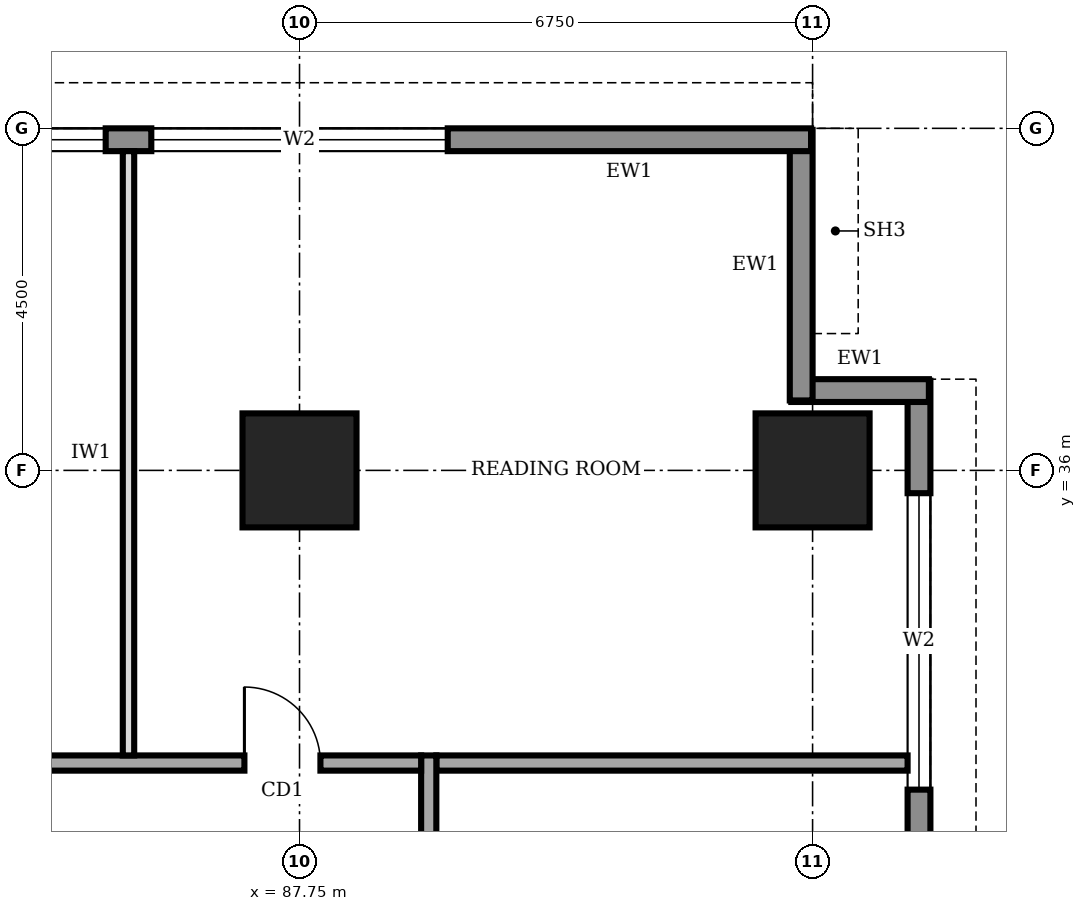
"""IFC4 building model, lengths in metres.
Left out: names, types, materials, properties, quantities, classifications, styles, units other than length and angle.
Written with IfcOpenShell. Run it as: python <this file> out.ifc"""

import sys

from ifc_helpers import new_model, si_unit, direction, frame, frame_2d, origin, origin_2d, place, context, subcontext, project, spatial, rectangle, extrude, element, fill, save


model = new_model("IFC4")
c1 = context("Model", 3, precision=1e-05, world=origin(), true_north=direction((0.0, 1.0)))
c2 = subcontext(c1, "Body", "Model", "MODEL_VIEW")
j1 = project(units=[si_unit("LENGTHUNIT", "METRE"), si_unit("PLANEANGLEUNIT", "RADIAN")], contexts=[c1])
p1 = place(None, origin())
s1 = spatial("IfcSite", under=j1, at=p1, CompositionType="ELEMENT")
p2 = place(p1, origin())
s2 = spatial("IfcBuilding", under=s1, at=p2, CompositionType="ELEMENT")
p3 = place(p2, frame((0.0, 0.0, 165.0)))
s3 = spatial("IfcBuildingStorey", under=s2, at=p3, CompositionType="ELEMENT", Elevation=165.0)
for number, where, z_axis, x_axis in (
    (1, (87.75, 36.0, 0.0), (0.0, 0.0, 1.0), (1.0, 0.0, 0.0)),
    (2, (94.5, 36.0, 0.0), (0.0, 0.0, 1.0), (1.0, 0.0, 0.0)),
):
    element("IfcColumn", number, at=place(p3, frame(where, z_axis=z_axis, x_axis=x_axis)), inside=s3, PredefinedType="COLUMN", context=c2, shape_type="SweptSolid", body=[
        extrude(rectangle(XDim=1.5, YDim=1.5, at=origin_2d()), origin(), (0.0, 0.0, 1.0), 4.0),
    ])
p4 = place(p3, frame((95.9, 3.32, 0.0), z_axis=(0.0, 0.0, 1.0), x_axis=(0.0, 1.0, 0.0)))
e3 = element("IfcWall", 3, at=p4, inside=s3, PredefinedType="STANDARD", context=c2, shape_type="SweptSolid", body=[
    extrude(rectangle(XDim=33.86, YDim=0.3, at=frame_2d((16.93, 0.0))), origin(), (0.0, 0.0, 1.0), 3.75),
])
p5 = place(p4, frame((1.48, 0.0, 0.6)))
e4 = element("IfcOpeningElement", 4, at=p5, cuts=e3, PredefinedType="OPENING", context=c2, shape_type="SweptSolid", body=[
    extrude(rectangle(XDim=3.9, YDim=2.6, at=frame_2d((1.95, 1.3))), frame((0.0, 0.16, 0.0), z_axis=(0.0, -1.0, 0.0), x_axis=(1.0, 0.0, 0.0)), (0.0, 0.0, 1.0), 0.32),
])
p6 = place(p4, frame((5.98, 0.0, 0.6)))
e5 = element("IfcOpeningElement", 5, at=p6, cuts=e3, PredefinedType="OPENING", context=c2, shape_type="SweptSolid", body=[
    extrude(rectangle(XDim=3.9, YDim=2.6, at=frame_2d((1.95, 1.3))), frame((0.0, 0.16, 0.0), z_axis=(0.0, -1.0, 0.0), x_axis=(1.0, 0.0, 0.0)), (0.0, 0.0, 1.0), 0.32),
])
p7 = place(p4, frame((10.48, 0.0, 0.6)))
e6 = element("IfcOpeningElement", 6, at=p7, cuts=e3, PredefinedType="OPENING", context=c2, shape_type="SweptSolid", body=[
    extrude(rectangle(XDim=3.9, YDim=2.6, at=frame_2d((1.95, 1.3))), frame((0.0, 0.16, 0.0), z_axis=(0.0, -1.0, 0.0), x_axis=(1.0, 0.0, 0.0)), (0.0, 0.0, 1.0), 0.32),
])
p8 = place(p4, frame((14.98, 0.0, 0.6)))
e7 = element("IfcOpeningElement", 7, at=p8, cuts=e3, PredefinedType="OPENING", context=c2, shape_type="SweptSolid", body=[
    extrude(rectangle(XDim=3.9, YDim=2.6, at=frame_2d((1.95, 1.3))), frame((0.0, 0.16, 0.0), z_axis=(0.0, -1.0, 0.0), x_axis=(1.0, 0.0, 0.0)), (0.0, 0.0, 1.0), 0.32),
])
p9 = place(p4, frame((19.48, 0.0, 0.6)))
e8 = element("IfcOpeningElement", 8, at=p9, cuts=e3, PredefinedType="OPENING", context=c2, shape_type="SweptSolid", body=[
    extrude(rectangle(XDim=3.9, YDim=2.6, at=frame_2d((1.95, 1.3))), frame((0.0, 0.16, 0.0), z_axis=(0.0, -1.0, 0.0), x_axis=(1.0, 0.0, 0.0)), (0.0, 0.0, 1.0), 0.32),
])
p10 = place(p4, frame((23.98, 0.0, 0.6)))
e9 = element("IfcOpeningElement", 9, at=p10, cuts=e3, PredefinedType="OPENING", context=c2, shape_type="SweptSolid", body=[
    extrude(rectangle(XDim=3.9, YDim=2.6, at=frame_2d((1.95, 1.3))), frame((0.0, 0.16, 0.0), z_axis=(0.0, -1.0, 0.0), x_axis=(1.0, 0.0, 0.0)), (0.0, 0.0, 1.0), 0.32),
])
p11 = place(p4, frame((28.48, 0.0, 0.6)))
e10 = element("IfcOpeningElement", 10, at=p11, cuts=e3, PredefinedType="OPENING", context=c2, shape_type="SweptSolid", body=[
    extrude(rectangle(XDim=3.9, YDim=2.6, at=frame_2d((1.95, 1.3))), frame((0.0, 0.16, 0.0), z_axis=(0.0, -1.0, 0.0), x_axis=(1.0, 0.0, 0.0)), (0.0, 0.0, 1.0), 0.32),
])
p12 = place(p3, frame((96.03, 37.05, 0.0), z_axis=(0.0, 0.0, 1.0), x_axis=(-1.0, 0.0, 0.0)))
e11 = element("IfcWall", 11, at=p12, inside=s3, PredefinedType="STANDARD", context=c2, shape_type="SweptSolid", body=[
    extrude(rectangle(XDim=1.81, YDim=0.3, at=frame_2d((0.905, 0.0))), origin(), (0.0, 0.0, 1.0), 3.75),
])
p13 = place(p3, frame((94.35, 36.92, 0.0), z_axis=(0.0, 0.0, 1.0), x_axis=(0.0, 1.0, 0.0)))
e12 = element("IfcWall", 12, at=p13, inside=s3, PredefinedType="STANDARD", context=c2, shape_type="SweptSolid", body=[
    extrude(rectangle(XDim=3.56, YDim=0.3, at=frame_2d((1.78, 0.0))), origin(), (0.0, 0.0, 1.0), 2.75),
])
p14 = place(p3, frame((94.48, 40.35, 0.0), z_axis=(0.0, 0.0, 1.0), x_axis=(-1.0, 0.0, 0.0)))
e13 = element("IfcWall", 13, at=p14, inside=s3, PredefinedType="STANDARD", context=c2, shape_type="SweptSolid", body=[
    extrude(rectangle(XDim=26.96, YDim=0.3, at=frame_2d((13.48, 0.0))), origin(), (0.0, 0.0, 1.0), 3.75),
])
p15 = place(p14, frame((22.78, 0.0, 0.6)))
e14 = element("IfcOpeningElement", 14, at=p15, cuts=e13, PredefinedType="OPENING", context=c2, shape_type="SweptSolid", body=[
    extrude(rectangle(XDim=3.9, YDim=2.6, at=frame_2d((1.95, 1.3))), frame((0.0, 0.16, 0.0), z_axis=(0.0, -1.0, 0.0), x_axis=(1.0, 0.0, 0.0)), (0.0, 0.0, 1.0), 0.32),
])
p16 = place(p14, frame((18.28, 0.0, 0.6)))
e15 = element("IfcOpeningElement", 15, at=p16, cuts=e13, PredefinedType="OPENING", context=c2, shape_type="SweptSolid", body=[
    extrude(rectangle(XDim=3.9, YDim=2.6, at=frame_2d((1.95, 1.3))), frame((0.0, 0.16, 0.0), z_axis=(0.0, -1.0, 0.0), x_axis=(1.0, 0.0, 0.0)), (0.0, 0.0, 1.0), 0.32),
])
p17 = place(p14, frame((13.78, 0.0, 0.6)))
e16 = element("IfcOpeningElement", 16, at=p17, cuts=e13, PredefinedType="OPENING", context=c2, shape_type="SweptSolid", body=[
    extrude(rectangle(XDim=3.9, YDim=2.6, at=frame_2d((1.95, 1.3))), frame((0.0, 0.16, 0.0), z_axis=(0.0, -1.0, 0.0), x_axis=(1.0, 0.0, 0.0)), (0.0, 0.0, 1.0), 0.32),
])
p18 = place(p14, frame((9.28, 0.0, 0.6)))
e17 = element("IfcOpeningElement", 17, at=p18, cuts=e13, PredefinedType="OPENING", context=c2, shape_type="SweptSolid", body=[
    extrude(rectangle(XDim=3.9, YDim=2.6, at=frame_2d((1.95, 1.3))), frame((0.0, 0.16, 0.0), z_axis=(0.0, -1.0, 0.0), x_axis=(1.0, 0.0, 0.0)), (0.0, 0.0, 1.0), 0.32),
])
p19 = place(p14, frame((4.78, 0.0, 0.6)))
e18 = element("IfcOpeningElement", 18, at=p19, cuts=e13, PredefinedType="OPENING", context=c2, shape_type="SweptSolid", body=[
    extrude(rectangle(XDim=3.9, YDim=2.6, at=frame_2d((1.95, 1.3))), frame((0.0, 0.16, 0.0), z_axis=(0.0, -1.0, 0.0), x_axis=(1.0, 0.0, 0.0)), (0.0, 0.0, 1.0), 0.32),
])
p20 = place(p3, frame((89.45, 9.2, 0.0), z_axis=(0.0, 0.0, 1.0), x_axis=(0.0, 1.0, 0.0)))
e19 = element("IfcWall", 19, at=p20, inside=s3, PredefinedType="SOLIDWALL", context=c2, shape_type="SweptSolid", body=[
    extrude(rectangle(XDim=23.05, YDim=0.2, at=frame_2d((11.525, 0.0))), origin(), (0.0, 0.0, 1.0), 3.75),
])
p21 = place(p20, frame((1.55, 0.0, 0.0)))
e20 = element("IfcOpeningElement", 20, at=p21, cuts=e19, PredefinedType="OPENING", context=c2, shape_type="SweptSolid", body=[
    extrude(rectangle(XDim=1.0, YDim=2.1, at=frame_2d((0.5, 1.05))), frame((0.0, 0.11, 0.0), z_axis=(0.0, -1.0, 0.0), x_axis=(1.0, 0.0, 0.0)), (0.0, 0.0, 1.0), 0.22),
])
p22 = place(p20, frame((5.05, 0.0, 0.0)))
e21 = element("IfcOpeningElement", 21, at=p22, cuts=e19, PredefinedType="OPENING", context=c2, shape_type="SweptSolid", body=[
    extrude(rectangle(XDim=0.9, YDim=2.1, at=frame_2d((0.45, 1.05))), frame((0.0, 0.11, 0.0), z_axis=(0.0, -1.0, 0.0), x_axis=(1.0, 0.0, 0.0)), (0.0, 0.0, 1.0), 0.22),
])
p23 = place(p20, frame((8.25, 0.0, 0.0)))
e22 = element("IfcOpeningElement", 22, at=p23, cuts=e19, PredefinedType="OPENING", context=c2, shape_type="SweptSolid", body=[
    extrude(rectangle(XDim=0.9, YDim=2.1, at=frame_2d((0.45, 1.05))), frame((0.0, 0.11, 0.0), z_axis=(0.0, -1.0, 0.0), x_axis=(1.0, 0.0, 0.0)), (0.0, 0.0, 1.0), 0.22),
])
p24 = place(p20, frame((13.8, 0.0, 0.0)))
e23 = element("IfcOpeningElement", 23, at=p24, cuts=e19, PredefinedType="OPENING", context=c2, shape_type="SweptSolid", body=[
    extrude(rectangle(XDim=0.9, YDim=2.1, at=frame_2d((0.45, 1.05))), frame((0.0, 0.11, 0.0), z_axis=(0.0, -1.0, 0.0), x_axis=(1.0, 0.0, 0.0)), (0.0, 0.0, 1.0), 0.22),
])
p25 = place(p20, frame((16.3, 0.0, 0.0)))
e24 = element("IfcOpeningElement", 24, at=p25, cuts=e19, PredefinedType="OPENING", context=c2, shape_type="SweptSolid", body=[
    extrude(rectangle(XDim=1.0, YDim=2.1, at=frame_2d((0.5, 1.05))), frame((0.0, 0.11, 0.0), z_axis=(0.0, -1.0, 0.0), x_axis=(1.0, 0.0, 0.0)), (0.0, 0.0, 1.0), 0.22),
])
p26 = place(p20, frame((11.2, 0.0, 0.0)))
e25 = element("IfcOpeningElement", 25, at=p26, cuts=e19, PredefinedType="OPENING", context=c2, shape_type="SweptSolid", body=[
    extrude(rectangle(XDim=1.0, YDim=2.1, at=frame_2d((0.5, 1.05))), frame((0.0, 0.11, 0.0), z_axis=(0.0, -1.0, 0.0), x_axis=(1.0, 0.0, 0.0)), (0.0, 0.0, 1.0), 0.22),
])
p27 = place(p20, frame((19.925, 0.0, 0.0)))
e26 = element("IfcOpeningElement", 26, at=p27, cuts=e19, PredefinedType="OPENING", context=c2, shape_type="SweptSolid", body=[
    extrude(rectangle(XDim=1.0, YDim=2.1, at=frame_2d((0.5, 1.05))), frame((0.0, 0.11, 0.0), z_axis=(0.0, -1.0, 0.0), x_axis=(1.0, 0.0, 0.0)), (0.0, 0.0, 1.0), 0.22),
])
p28 = place(p3, frame((89.35, 32.15, 0.0), z_axis=(0.0, 0.0, 1.0), x_axis=(-1.0, 0.0, 0.0)))
e27 = element("IfcWall", 27, at=p28, inside=s3, PredefinedType="SOLIDWALL", context=c2, shape_type="SweptSolid", body=[
    extrude(rectangle(XDim=26.05, YDim=0.2, at=frame_2d((13.025, 0.0))), origin(), (0.0, 0.0, 1.0), 3.75),
])
p29 = place(p28, frame((19.05, 0.0, 0.0)))
e28 = element("IfcOpeningElement", 28, at=p29, cuts=e27, PredefinedType="OPENING", context=c2, shape_type="SweptSolid", body=[
    extrude(rectangle(XDim=1.0, YDim=2.1, at=frame_2d((0.5, 1.05))), frame((0.0, 0.11, 0.0), z_axis=(0.0, -1.0, 0.0), x_axis=(1.0, 0.0, 0.0)), (0.0, 0.0, 1.0), 0.22),
])
p30 = place(p28, frame((10.1, 0.0, 0.0)))
e29 = element("IfcOpeningElement", 29, at=p30, cuts=e27, PredefinedType="OPENING", context=c2, shape_type="SweptSolid", body=[
    extrude(rectangle(XDim=1.0, YDim=2.1, at=frame_2d((0.5, 1.05))), frame((0.0, 0.11, 0.0), z_axis=(0.0, -1.0, 0.0), x_axis=(1.0, 0.0, 0.0)), (0.0, 0.0, 1.0), 0.22),
])
p31 = place(p28, frame((5.6, 0.0, 0.0)))
e30 = element("IfcOpeningElement", 30, at=p31, cuts=e27, PredefinedType="OPENING", context=c2, shape_type="SweptSolid", body=[
    extrude(rectangle(XDim=1.0, YDim=2.1, at=frame_2d((0.5, 1.05))), frame((0.0, 0.11, 0.0), z_axis=(0.0, -1.0, 0.0), x_axis=(1.0, 0.0, 0.0)), (0.0, 0.0, 1.0), 0.22),
])
p32 = place(p28, frame((1.325, 0.0, 0.0)))
e31 = element("IfcOpeningElement", 31, at=p32, cuts=e27, PredefinedType="OPENING", context=c2, shape_type="SweptSolid", body=[
    extrude(rectangle(XDim=1.0, YDim=2.1, at=frame_2d((0.5, 1.05))), frame((0.0, 0.11, 0.0), z_axis=(0.0, -1.0, 0.0), x_axis=(1.0, 0.0, 0.0)), (0.0, 0.0, 1.0), 0.22),
])
p33 = place(p3, frame((89.55, 32.15, 0.0), z_axis=(0.0, 0.0, 1.0), x_axis=(1.0, 0.0, 0.0)))
e32 = element("IfcWall", 32, at=p33, inside=s3, PredefinedType="SOLIDWALL", context=c2, shape_type="SweptSolid", body=[
    extrude(rectangle(XDim=6.2, YDim=0.2, at=frame_2d((3.1, 0.0))), origin(), (0.0, 0.0, 1.0), 3.75),
])
p34 = place(p3, frame((85.5, 32.25, 0.0), z_axis=(0.0, 0.0, 1.0), x_axis=(0.0, 1.0, 0.0)))
e33 = element("IfcWall", 33, at=p34, inside=s3, PredefinedType="PARTITIONING", context=c2, shape_type="SweptSolid", body=[
    extrude(rectangle(XDim=7.95, YDim=0.15, at=frame_2d((3.975, 0.0))), origin(), (0.0, 0.0, 1.0), 3.75),
])
p35 = place(p11, origin())
e34 = element("IfcWindow", 34, at=p35, inside=s3, PartitioningType="SINGLE_PANEL", PredefinedType="WINDOW", context=c2, shape_type="SweptSolid", body=[
    extrude(rectangle(XDim=3.9, YDim=2.6, at=frame_2d((1.95, 1.3))), frame((0.0, 0.03, 0.0), z_axis=(0.0, -1.0, 0.0), x_axis=(1.0, 0.0, 0.0)), (0.0, 0.0, 1.0), 0.06),
])
fill(e10, e34)
p36 = place(p18, origin())
e35 = element("IfcWindow", 35, at=p36, inside=s3, PartitioningType="SINGLE_PANEL", PredefinedType="WINDOW", context=c2, shape_type="SweptSolid", body=[
    extrude(rectangle(XDim=3.9, YDim=2.6, at=frame_2d((1.95, 1.3))), frame((0.0, 0.03, 0.0), z_axis=(0.0, -1.0, 0.0), x_axis=(1.0, 0.0, 0.0)), (0.0, 0.0, 1.0), 0.06),
])
fill(e17, e35)
p37 = place(p19, origin())
e36 = element("IfcWindow", 36, at=p37, inside=s3, PartitioningType="SINGLE_PANEL", PredefinedType="WINDOW", context=c2, shape_type="SweptSolid", body=[
    extrude(rectangle(XDim=3.9, YDim=2.6, at=frame_2d((1.95, 1.3))), frame((0.0, 0.03, 0.0), z_axis=(0.0, -1.0, 0.0), x_axis=(1.0, 0.0, 0.0)), (0.0, 0.0, 1.0), 0.06),
])
fill(e18, e36)
p38 = place(p32, frame((1.0, 0.0, 0.0), z_axis=(0.0, 0.0, 1.0), x_axis=(-1.0, 0.0, 0.0)))
e37 = element("IfcDoor", 37, at=p38, inside=s3, OperationType="SINGLE_SWING_LEFT", PredefinedType="DOOR", context=c2, shape_type="SweptSolid", body=[
    extrude(rectangle(XDim=1.0, YDim=2.1, at=frame_2d((0.5, 1.05))), frame((0.0, 0.025, 0.0), z_axis=(0.0, -1.0, 0.0), x_axis=(1.0, 0.0, 0.0)), (0.0, 0.0, 1.0), 0.05),
])
fill(e31, e37)
save(model, sys.argv[1])
